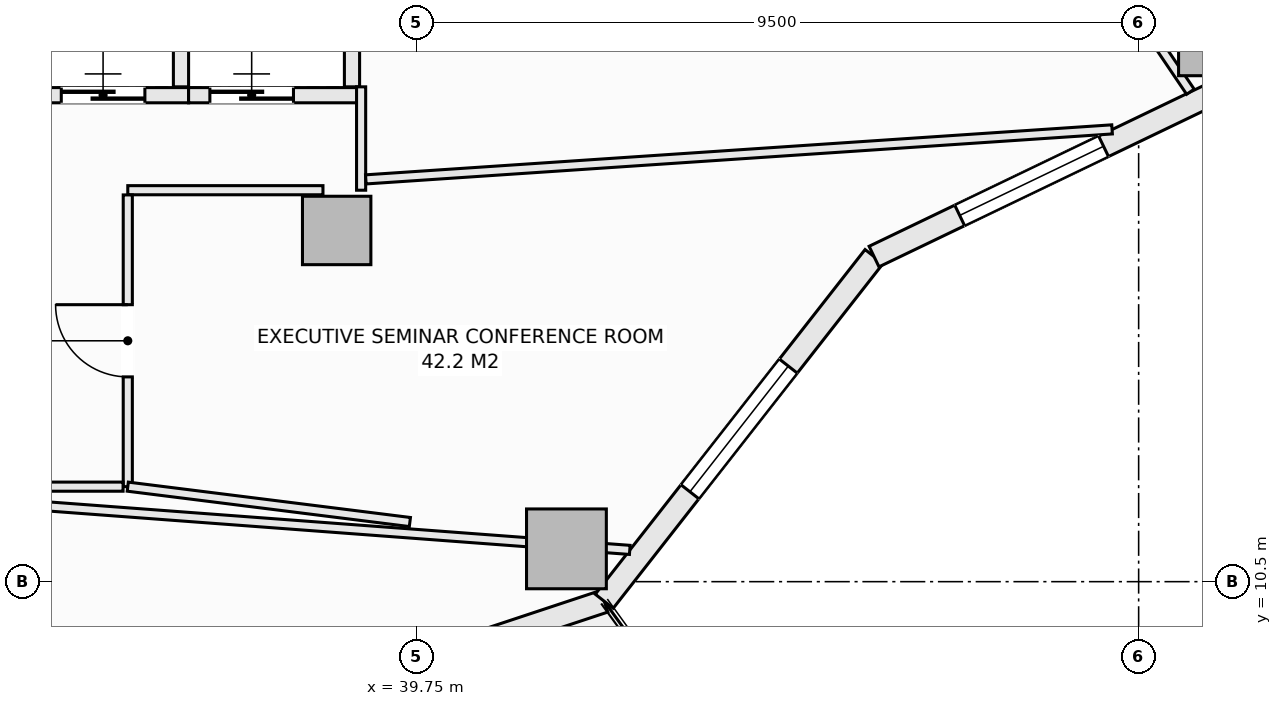
"""IFC4 building model, lengths in metres.
Left out: names, types, materials, properties, quantities, classifications, styles, units other than length and angle.
Written with IfcOpenShell. Run it as: python <this file> out.ifc"""

import sys

from ifc_helpers import new_model, si_unit, direction, frame, frame_2d, origin, origin_2d, place, context, subcontext, project, spatial, rectangle, extrude, element, fill, save


model = new_model("IFC4")
c1 = context("Model", 3, precision=1e-05, world=origin(), true_north=direction((0.0, 1.0)))
c2 = subcontext(c1, "Body", "Model", "MODEL_VIEW")
j1 = project(units=[si_unit("LENGTHUNIT", "METRE"), si_unit("PLANEANGLEUNIT", "RADIAN")], contexts=[c1])
p1 = place(None, origin())
s1 = spatial("IfcSite", under=j1, at=p1, CompositionType="ELEMENT")
p2 = place(p1, origin())
s2 = spatial("IfcBuilding", under=s1, at=p2, CompositionType="ELEMENT")
p3 = place(p2, frame((0.0, 0.0, 125.7)))
s3 = spatial("IfcBuildingStorey", under=s2, at=p3, CompositionType="ELEMENT", Elevation=125.7)
for number, where, z_axis, x_axis in (
    (1, (41.721, 10.932, -0.27), (0.0, 0.0, 1.0), (1.0, 0.0, 0.0)),
    (2, (50.3, 17.681, -0.27), (0.0, 0.0, 1.0), (1.0, 0.0, 0.0)),
):
    element("IfcColumn", number, at=place(p3, frame(where, z_axis=z_axis, x_axis=x_axis)), inside=s3, PredefinedType="COLUMN", context=c2, shape_type="SweptSolid", body=[
        extrude(rectangle(XDim=1.05, YDim=1.05, at=origin_2d()), origin(), (0.0, 0.0, 1.0), 3.4),
    ])
p4 = place(p3, frame((38.698, 15.121, -0.27), z_axis=(0.0, 0.0, 1.0), x_axis=(1.0, 0.0, 0.0)))
e3 = element("IfcColumn", 3, at=p4, inside=s3, PredefinedType="COLUMN", context=c2, shape_type="SweptSolid", body=[
    extrude(rectangle(XDim=0.9, YDim=0.9, at=origin_2d()), origin(), (0.0, 0.0, 1.0), 3.4),
])
p5 = place(p3, frame((36.385, 8.309, 0.0), z_axis=(0.0, 0.0, 1.0), x_axis=(0.949238009374, 0.314558741032, 0.0)))
e4 = element("IfcWall", 4, at=p5, inside=s3, PredefinedType="SOLIDWALL", context=c2, shape_type="SweptSolid", body=[
    extrude(rectangle(XDim=6.146, YDim=0.3, at=frame_2d((3.073, 0.0))), origin(), (0.0, 0.0, 1.0), 2.653),
])
p6 = place(p5, frame((2.023, 0.0, 0.74)))
e5 = element("IfcOpeningElement", 5, at=p6, cuts=e4, PredefinedType="OPENING", context=c2, shape_type="SweptSolid", body=[
    extrude(rectangle(XDim=2.1, YDim=1.7, at=frame_2d((1.05, 0.85))), frame((0.0, 0.16, 0.0), z_axis=(0.0, -1.0, 0.0), x_axis=(1.0, 0.0, 0.0)), (0.0, 0.0, 1.0), 0.32),
])
p7 = place(p3, frame((42.219, 10.242, 0.0), z_axis=(0.0, 0.0, 1.0), x_axis=(0.616435134162, 0.787405693001, 0.0)))
e6 = element("IfcWall", 6, at=p7, inside=s3, PredefinedType="SOLIDWALL", context=c2, shape_type="SweptSolid", body=[
    extrude(rectangle(XDim=5.759, YDim=0.3, at=frame_2d((2.879, 0.0))), origin(), (0.0, 0.0, 1.0), 2.653),
])
p8 = place(p7, frame((1.829, 0.0, 0.74)))
e7 = element("IfcOpeningElement", 7, at=p8, cuts=e6, PredefinedType="OPENING", context=c2, shape_type="SweptSolid", body=[
    extrude(rectangle(XDim=2.1, YDim=1.7, at=frame_2d((1.05, 0.85))), frame((0.0, 0.16, 0.0), z_axis=(0.0, -1.0, 0.0), x_axis=(1.0, 0.0, 0.0)), (0.0, 0.0, 1.0), 0.32),
])
p9 = place(p3, frame((45.769, 14.777, 0.0), z_axis=(0.0, 0.0, 1.0), x_axis=(0.901370184739, 0.433049408339, 0.0)))
e8 = element("IfcWall", 8, at=p9, inside=s3, PredefinedType="SOLIDWALL", context=c2, shape_type="SweptSolid", body=[
    extrude(rectangle(XDim=5.884, YDim=0.3, at=frame_2d((2.942, 0.0))), origin(), (0.0, 0.0, 1.0), 2.653),
])
p10 = place(p9, frame((1.25, 0.0, 0.74)))
e9 = element("IfcOpeningElement", 9, at=p10, cuts=e8, PredefinedType="OPENING", context=c2, shape_type="SweptSolid", body=[
    extrude(rectangle(XDim=2.1, YDim=1.7, at=frame_2d((1.05, 0.85))), frame((0.0, 0.16, 0.0), z_axis=(0.0, -1.0, 0.0), x_axis=(1.0, 0.0, 0.0)), (0.0, 0.0, 1.0), 0.32),
])
p11 = place(p3, frame((34.5, 16.9, 0.0), z_axis=(0.0, 0.0, 1.0), x_axis=(1.0, 0.0, 0.0)))
e10 = element("IfcWall", 10, at=p11, inside=s3, PredefinedType="SOLIDWALL", context=c2, shape_type="SweptSolid", body=[
    extrude(rectangle(XDim=2.25, YDim=0.2, at=frame_2d((1.125, 0.0))), origin(), (0.0, 0.0, 1.0), 3.13),
])
p12 = place(p11, frame((0.575, 0.0, 0.0)))
e11 = element("IfcOpeningElement", 11, at=p12, cuts=e10, PredefinedType="OPENING", context=c2, shape_type="SweptSolid", body=[
    extrude(rectangle(XDim=1.1, YDim=2.2, at=frame_2d((0.55, 1.1))), frame((0.0, 0.11, 0.0), z_axis=(0.0, -1.0, 0.0), x_axis=(1.0, 0.0, 0.0)), (0.0, 0.0, 1.0), 0.22),
])
p13 = place(p3, frame((36.65, 17.01, 0.0), z_axis=(0.0, 0.0, 1.0), x_axis=(0.0, 1.0, 0.0)))
e12 = element("IfcWall", 12, at=p13, inside=s3, PredefinedType="SOLIDWALL", context=c2, shape_type="SweptSolid", body=[
    extrude(rectangle(XDim=2.43, YDim=0.2, at=frame_2d((1.215, 0.0))), origin(), (0.0, 0.0, 1.0), 3.13),
])
p14 = place(p3, frame((36.75, 16.9, 0.0), z_axis=(0.0, 0.0, 1.0), x_axis=(1.0, 0.0, 0.0)))
e13 = element("IfcWall", 13, at=p14, inside=s3, PredefinedType="SOLIDWALL", context=c2, shape_type="SweptSolid", body=[
    extrude(rectangle(XDim=2.25, YDim=0.2, at=frame_2d((1.125, 0.0))), origin(), (0.0, 0.0, 1.0), 3.13),
])
p15 = place(p14, frame((0.28, 0.0, 0.0)))
e14 = element("IfcOpeningElement", 14, at=p15, cuts=e13, PredefinedType="OPENING", context=c2, shape_type="SweptSolid", body=[
    extrude(rectangle(XDim=1.1, YDim=2.2, at=frame_2d((0.55, 1.1))), frame((0.0, 0.11, 0.0), z_axis=(0.0, -1.0, 0.0), x_axis=(1.0, 0.0, 0.0)), (0.0, 0.0, 1.0), 0.22),
])
p16 = place(p3, frame((38.9, 17.01, 0.0), z_axis=(0.0, 0.0, 1.0), x_axis=(0.0, 1.0, 0.0)))
e15 = element("IfcWall", 15, at=p16, inside=s3, PredefinedType="SOLIDWALL", context=c2, shape_type="SweptSolid", body=[
    extrude(rectangle(XDim=2.43, YDim=0.2, at=frame_2d((1.215, 0.0))), origin(), (0.0, 0.0, 1.0), 3.13),
])
p17 = place(p3, frame((39.02, 15.65, 0.0), z_axis=(0.0, 0.0, 1.0), x_axis=(0.0, 1.0, 0.0)))
e16 = element("IfcWall", 16, at=p17, inside=s3, PredefinedType="PARTITIONING", context=c2, shape_type="SweptSolid", body=[
    extrude(rectangle(XDim=1.36, YDim=0.12, at=frame_2d((0.68, 0.0))), origin(), (0.0, 0.0, 1.0), 2.505),
])
p18 = place(p3, frame((35.95, 15.65, 0.0), z_axis=(0.0, 0.0, 1.0), x_axis=(1.0, 0.0, 0.0)))
e17 = element("IfcWall", 17, at=p18, inside=s3, PredefinedType="PARTITIONING", context=c2, shape_type="SweptSolid", body=[
    extrude(rectangle(XDim=2.568, YDim=0.12, at=frame_2d((1.284, 0.0))), origin(), (0.0, 0.0, 1.0), 3.13),
])
p19 = place(p3, frame((35.95, 11.75, 0.0), z_axis=(0.0, 0.0, 1.0), x_axis=(0.0, 1.0, 0.0)))
e18 = element("IfcWall", 18, at=p19, inside=s3, PredefinedType="PARTITIONING", context=c2, shape_type="SweptSolid", body=[
    extrude(rectangle(XDim=3.838, YDim=0.12, at=frame_2d((1.919, 0.0))), origin(), (0.0, 0.0, 1.0), 3.13),
])
p20 = place(p19, frame((1.444, 0.0, 0.0)))
e19 = element("IfcOpeningElement", 19, at=p20, cuts=e18, PredefinedType="OPENING", context=c2, shape_type="SweptSolid", body=[
    extrude(rectangle(XDim=0.95, YDim=2.1, at=frame_2d((0.475, 1.05))), frame((0.0, 0.07, 0.0), z_axis=(0.0, -1.0, 0.0), x_axis=(1.0, 0.0, 0.0)), (0.0, 0.0, 1.0), 0.14),
])
p21 = place(p3, frame((27.212, 11.75, 0.0), z_axis=(0.0, 0.0, 1.0), x_axis=(1.0, 0.0, 0.0)))
e20 = element("IfcWall", 20, at=p21, inside=s3, PredefinedType="PARTITIONING", context=c2, shape_type="SweptSolid", body=[
    extrude(rectangle(XDim=8.676, YDim=0.12, at=frame_2d((4.338, 0.0))), origin(), (0.0, 0.0, 1.0), 3.13),
])
p22 = place(p21, frame((3.321, 0.0, 0.0)))
e21 = element("IfcOpeningElement", 21, at=p22, cuts=e20, PredefinedType="OPENING", context=c2, shape_type="SweptSolid", body=[
    extrude(rectangle(XDim=0.95, YDim=2.1, at=frame_2d((0.475, 1.05))), frame((0.0, 0.07, 0.0), z_axis=(0.0, -1.0, 0.0), x_axis=(1.0, 0.0, 0.0)), (0.0, 0.0, 1.0), 0.14),
])
p23 = place(p3, frame((39.082, 15.792, 0.0), z_axis=(0.0, 0.0, 1.0), x_axis=(0.997763809534, 0.066838464862, 0.0)))
e22 = element("IfcWall", 22, at=p23, inside=s3, PredefinedType="PARTITIONING", context=c2, shape_type="SweptSolid", body=[
    extrude(rectangle(XDim=9.84, YDim=0.12, at=frame_2d((4.92, 0.0))), origin(), (0.0, 0.0, 1.0), 2.653),
])
p24 = place(p3, frame((33.427, 11.6, 0.0), z_axis=(0.0, 0.0, 1.0), x_axis=(0.997219068795, -0.074526027877, 0.0)))
e23 = element("IfcWall", 23, at=p24, inside=s3, PredefinedType="PARTITIONING", context=c2, shape_type="SweptSolid", body=[
    extrude(rectangle(XDim=9.153, YDim=0.12, at=frame_2d((4.576, 0.0))), origin(), (0.0, 0.0, 1.0), 2.653),
])
p25 = place(p3, frame((35.95, 11.75, 0.0), z_axis=(0.0, 0.0, 1.0), x_axis=(0.992232627011, -0.124396197269, 0.0)))
e24 = element("IfcWall", 24, at=p25, inside=s3, PredefinedType="PARTITIONING", context=c2, shape_type="SweptSolid", body=[
    extrude(rectangle(XDim=3.741, YDim=0.12, at=frame_2d((1.87, 0.0))), origin(), (0.0, 0.0, 1.0), 3.13),
])
p26 = place(p3, frame((38.862, 33.324, 0.0), z_axis=(0.0, 0.0, 1.0), x_axis=(0.55994174094, -0.828531982939, 0.0)))
e25 = element("IfcWall", 25, at=p26, inside=s3, PredefinedType="PARTITIONING", context=c2, shape_type="SweptSolid", body=[
    extrude(rectangle(XDim=19.768, YDim=0.12, at=frame_2d((9.884, 0.0))), origin(), (0.0, 0.0, 1.0), 2.505),
])
p27 = place(p8, origin())
e26 = element("IfcWindow", 26, at=p27, inside=s3, PartitioningType="SINGLE_PANEL", PredefinedType="WINDOW", context=c2, shape_type="SweptSolid", body=[
    extrude(rectangle(XDim=2.1, YDim=1.7, at=frame_2d((1.05, 0.85))), frame((0.0, 0.03, 0.0), z_axis=(0.0, -1.0, 0.0), x_axis=(1.0, 0.0, 0.0)), (0.0, 0.0, 1.0), 0.06),
])
fill(e7, e26)
p28 = place(p10, origin())
e27 = element("IfcWindow", 27, at=p28, inside=s3, PartitioningType="SINGLE_PANEL", PredefinedType="WINDOW", context=c2, shape_type="SweptSolid", body=[
    extrude(rectangle(XDim=2.1, YDim=1.7, at=frame_2d((1.05, 0.85))), frame((0.0, 0.03, 0.0), z_axis=(0.0, -1.0, 0.0), x_axis=(1.0, 0.0, 0.0)), (0.0, 0.0, 1.0), 0.06),
])
fill(e9, e27)
p29 = place(p12, origin())
e28 = element("IfcDoor", 28, at=p29, inside=s3, OperationType="SLIDING_TO_LEFT", PredefinedType="DOOR", context=c2, shape_type="SweptSolid", body=[
    extrude(rectangle(XDim=1.1, YDim=2.2, at=frame_2d((0.55, 1.1))), frame((0.0, 0.025, 0.0), z_axis=(0.0, -1.0, 0.0), x_axis=(1.0, 0.0, 0.0)), (0.0, 0.0, 1.0), 0.05),
])
fill(e11, e28)
p30 = place(p15, origin())
e29 = element("IfcDoor", 29, at=p30, inside=s3, OperationType="SLIDING_TO_LEFT", PredefinedType="DOOR", context=c2, shape_type="SweptSolid", body=[
    extrude(rectangle(XDim=1.1, YDim=2.2, at=frame_2d((0.55, 1.1))), frame((0.0, 0.025, 0.0), z_axis=(0.0, -1.0, 0.0), x_axis=(1.0, 0.0, 0.0)), (0.0, 0.0, 1.0), 0.05),
])
fill(e14, e29)
p31 = place(p20, origin())
e30 = element("IfcDoor", 30, at=p31, inside=s3, OperationType="SINGLE_SWING_RIGHT", PredefinedType="DOOR", context=c2, shape_type="SweptSolid", body=[
    extrude(rectangle(XDim=0.95, YDim=2.1, at=frame_2d((0.475, 1.05))), frame((0.0, 0.025, 0.0), z_axis=(0.0, -1.0, 0.0), x_axis=(1.0, 0.0, 0.0)), (0.0, 0.0, 1.0), 0.05),
])
fill(e19, e30)
save(model, sys.argv[1])
